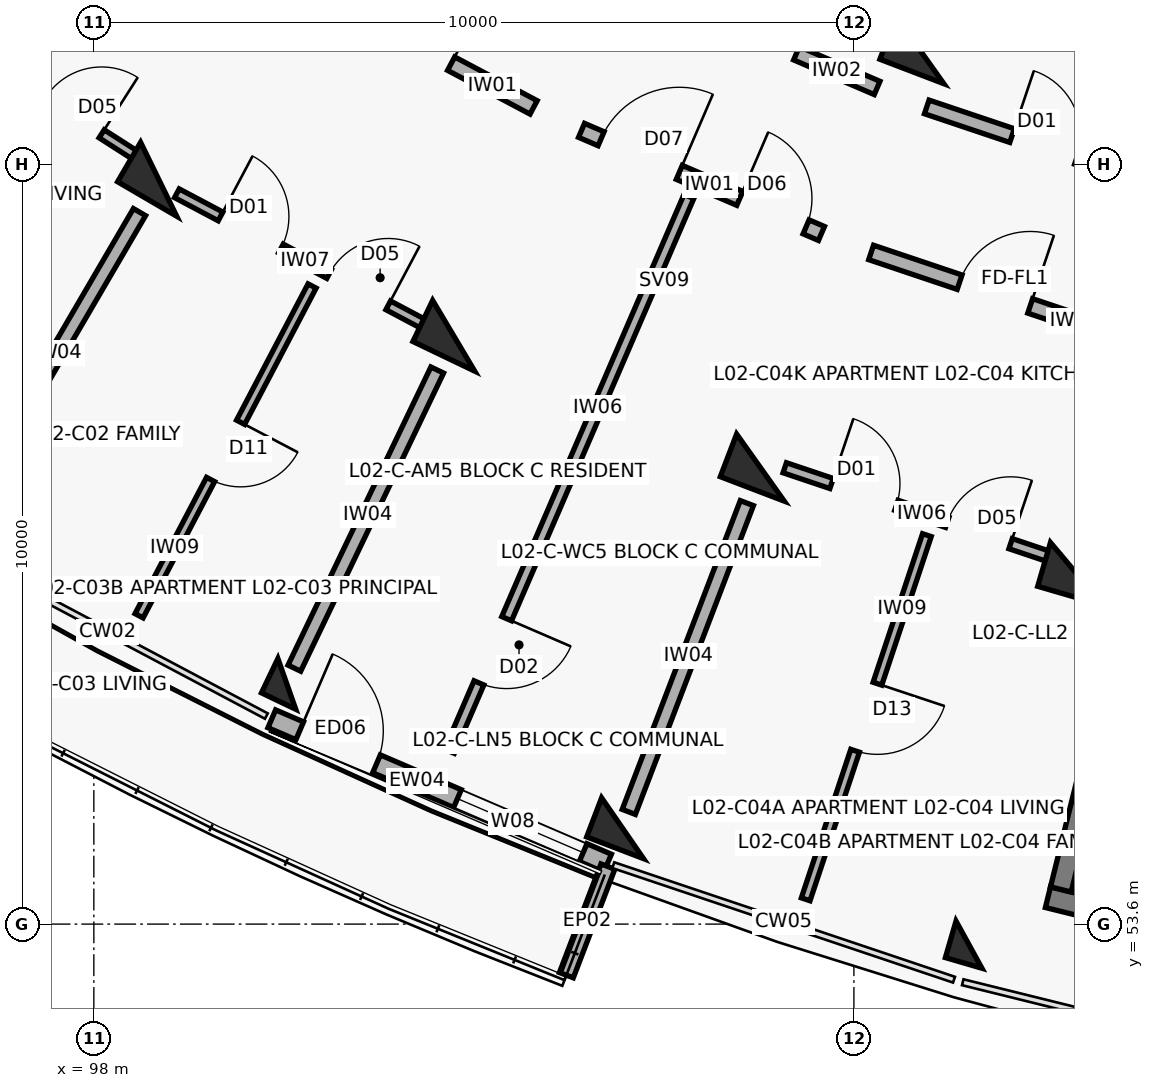
"""IFC4 building model, lengths in metres.
Left out: names, types, materials, properties, quantities, classifications, styles, units other than length and angle.
Written with IfcOpenShell. Run it as: python <this file> out.ifc"""

import sys

from ifc_helpers import new_model, si_unit, direction, frame, frame_2d, origin, origin_2d, place, context, subcontext, project, spatial, rectangle, extrude, element, fill, save


model = new_model("IFC4")
c1 = context("Model", 3, precision=1e-05, world=origin(), true_north=direction((0.0, 1.0)))
c2 = subcontext(c1, "Body", "Model", "MODEL_VIEW")
j1 = project(units=[si_unit("LENGTHUNIT", "METRE"), si_unit("PLANEANGLEUNIT", "RADIAN")], contexts=[c1])
p1 = place(None, origin())
s1 = spatial("IfcSite", under=j1, at=p1, CompositionType="ELEMENT")
p2 = place(p1, origin())
s2 = spatial("IfcBuilding", under=s1, at=p2, CompositionType="ELEMENT")
p3 = place(p2, frame((0.0, 0.0, 8.1)))
s3 = spatial("IfcBuildingStorey", under=s2, at=p3, CompositionType="ELEMENT", Elevation=8.1)
for number, where, z_axis, x_axis in (
    (1, (98.853, 63.4, 0.0), (0.0, 0.0, 1.0), (-0.504, -0.864, 0.0)),
    (2, (102.734, 61.341, 0.0), (0.0, 0.0, 1.0), (-0.432, -0.902, 0.0)),
):
    element("IfcColumn", number, at=place(p3, frame(where, z_axis=z_axis, x_axis=x_axis)), inside=s3, PredefinedType="COLUMN", context=c2, shape_type="SweptSolid", body=[
        extrude(rectangle(XDim=0.6, YDim=0.9, at=origin_2d()), origin(), (0.0, 0.0, 1.0), 3.1),
    ])
p4 = place(p3, frame((100.539, 56.76, 0.0), z_axis=(0.0, 0.0, 1.0), x_axis=(-0.432085748802, -0.901832526405, 0.0)))
e3 = element("IfcColumn", 3, at=p4, inside=s3, PredefinedType="COLUMN", context=c2, shape_type="SweptSolid", body=[
    extrude(rectangle(XDim=0.5, YDim=0.5, at=origin_2d()), origin(), (0.0, 0.0, 1.0), 3.1),
])
for number, where, z_axis, x_axis in (
    (4, (108.869, 65.099, 0.0), (0.0, 0.0, 1.0), (-0.357, -0.934, 0.0)),
    (5, (106.77, 59.606, 0.0), (0.0, 0.0, 1.0), (-0.357, -0.934, 0.0)),
):
    element("IfcColumn", number, at=place(p3, frame(where, z_axis=z_axis, x_axis=x_axis)), inside=s3, PredefinedType="COLUMN", context=c2, shape_type="SweptSolid", body=[
        extrude(rectangle(XDim=0.6, YDim=0.9, at=origin_2d()), origin(), (0.0, 0.0, 1.0), 3.1),
    ])
p5 = place(p3, frame((104.956, 54.861, 0.0), z_axis=(0.0, 0.0, 1.0), x_axis=(-0.357064076459, -0.934079892355, 0.0)))
e6 = element("IfcColumn", 6, at=p5, inside=s3, PredefinedType="COLUMN", context=c2, shape_type="SweptSolid", body=[
    extrude(rectangle(XDim=0.55, YDim=0.8, at=origin_2d()), origin(), (0.0, 0.0, 1.0), 3.1),
])
p6 = place(p3, frame((110.934, 58.207, 0.0), z_axis=(0.0, 0.0, 1.0), x_axis=(-0.27966144946, -0.96009867914, 0.0)))
e7 = element("IfcColumn", 7, at=p6, inside=s3, PredefinedType="COLUMN", context=c2, shape_type="SweptSolid", body=[
    extrude(rectangle(XDim=0.6, YDim=0.9, at=origin_2d()), origin(), (0.0, 0.0, 1.0), 3.1),
])
p7 = place(p3, frame((109.513, 53.329, 0.0), z_axis=(0.0, 0.0, 1.0), x_axis=(-0.27966144946, -0.96009867914, 0.0)))
e8 = element("IfcColumn", 8, at=p7, inside=s3, PredefinedType="COLUMN", context=c2, shape_type="SweptSolid", body=[
    extrude(rectangle(XDim=0.5, YDim=0.5, at=origin_2d()), origin(), (0.0, 0.0, 1.0), 3.1),
])
p8 = place(p3, frame((100.341, 56.301, 0.0), z_axis=(0.0, 0.0, 1.0), x_axis=(0.918737524932, -0.39486878869, 0.0)))
e9 = element("IfcWall", 9, at=p8, inside=s3, PredefinedType="SOLIDWALL", context=c2, shape_type="SweptSolid", body=[
    extrude(rectangle(XDim=4.809, YDim=0.255, at=frame_2d((2.405, 0.0))), origin(), (0.0, 0.0, 1.0), 2.25),
])
p9 = place(p8, frame((0.4, 0.0, 0.0)))
e10 = element("IfcOpeningElement", 10, at=p9, cuts=e9, PredefinedType="OPENING", context=c2, shape_type="SweptSolid", body=[
    extrude(rectangle(XDim=1.1, YDim=2.15, at=frame_2d((0.55, 1.075))), frame((0.0, 0.137, 0.0), z_axis=(0.0, -1.0, 0.0), x_axis=(1.0, 0.0, 0.0)), (0.0, 0.0, 1.0), 0.275),
])
p10 = place(p8, frame((2.659, 0.0, 0.35)))
e11 = element("IfcOpeningElement", 11, at=p10, cuts=e9, PredefinedType="OPENING", context=c2, shape_type="SweptSolid", body=[
    extrude(rectangle(XDim=1.8, YDim=1.65, at=frame_2d((0.9, 0.825))), frame((0.0, 0.137, 0.0), z_axis=(0.0, -1.0, 0.0), x_axis=(1.0, 0.0, 0.0)), (0.0, 0.0, 1.0), 0.275),
])
p11 = place(p3, frame((104.763, 54.357, 0.0), z_axis=(0.0, 0.0, 1.0), x_axis=(-0.356957296461, -0.934120703391, 0.0)))
e12 = element("IfcWall", 12, at=p11, inside=s3, PredefinedType="PARAPET", context=c2, shape_type="SweptSolid", body=[
    extrude(rectangle(XDim=1.53, YDim=0.195, at=frame_2d((0.765, 0.0))), origin(), (0.0, 0.0, 1.0), 2.25),
])
p12 = place(p3, frame((110.553, 53.954, 0.0), z_axis=(0.0, 0.0, 1.0), x_axis=(0.970725280816, -0.240192483614, 0.0)))
e13 = element("IfcWall", 13, at=p12, inside=s3, PredefinedType="SHEAR", context=c2, shape_type="SweptSolid", body=[
    extrude(rectangle(XDim=3.09, YDim=0.28, at=frame_2d((1.545, 0.0))), origin(), (0.0, 0.0, 1.0), 3.1),
])
p13 = place(p3, frame((111.21, 56.027, 0.0), z_axis=(0.0, 0.0, 1.0), x_axis=(-0.240186044774, -0.970726873995, 0.0)))
e14 = element("IfcWall", 14, at=p13, inside=s3, PredefinedType="SHEAR", context=c2, shape_type="SweptSolid", body=[
    extrude(rectangle(XDim=2.03, YDim=0.28, at=frame_2d((1.015, 0.0))), origin(), (0.0, 0.0, 1.0), 3.1),
])
p14 = place(p3, frame((95.462, 65.688, 0.0), z_axis=(0.0, 0.0, 1.0), x_axis=(0.842274914974, -0.539048205271, 0.0)))
e15 = element("IfcWall", 15, at=p14, inside=s3, PredefinedType="PARTITIONING", context=c2, shape_type="SweptSolid", body=[
    extrude(rectangle(XDim=3.785, YDim=0.125, at=frame_2d((1.893, 0.0))), origin(), (0.0, 0.0, 1.0), 2.08),
])
p15 = place(p14, frame((0.65, 0.0, 0.0)))
e16 = element("IfcOpeningElement", 16, at=p15, cuts=e15, PredefinedType="OPENING", context=c2, shape_type="SweptSolid", body=[
    extrude(rectangle(XDim=0.9, YDim=2.1, at=frame_2d((0.45, 1.05))), frame((0.0, 0.073, 0.0), z_axis=(0.0, -1.0, 0.0), x_axis=(1.0, 0.0, 0.0)), (0.0, 0.0, 1.0), 0.145),
])
p16 = place(p14, frame((2.255, 0.0, 0.0)))
e17 = element("IfcOpeningElement", 17, at=p16, cuts=e15, PredefinedType="OPENING", context=c2, shape_type="SweptSolid", body=[
    extrude(rectangle(XDim=0.88, YDim=2.1, at=frame_2d((0.44, 1.05))), frame((0.0, 0.073, 0.0), z_axis=(0.0, -1.0, 0.0), x_axis=(1.0, 0.0, 0.0)), (0.0, 0.0, 1.0), 0.145),
])
p17 = place(p3, frame((100.75, 65.956, 0.0), z_axis=(0.0, 0.0, 1.0), x_axis=(0.883440266101, -0.468543803963, 0.0)))
e18 = element("IfcWall", 18, at=p17, inside=s3, PredefinedType="SOLIDWALL", context=c2, shape_type="SweptSolid", body=[
    extrude(rectangle(XDim=3.436, YDim=0.2, at=frame_2d((1.718, 0.0))), origin(), (0.0, 0.0, 1.0), 2.08),
])
p18 = place(p17, frame((1.228, 0.0, 0.0)))
e19 = element("IfcOpeningElement", 19, at=p18, cuts=e18, PredefinedType="OPENING", context=c2, shape_type="SweptSolid", body=[
    extrude(rectangle(XDim=0.98, YDim=2.15, at=frame_2d((0.49, 1.075))), frame((0.0, 0.11, 0.0), z_axis=(0.0, -1.0, 0.0), x_axis=(1.0, 0.0, 0.0)), (0.0, 0.0, 1.0), 0.22),
])
p19 = place(p3, frame((99.093, 63.216, 0.0), z_axis=(0.0, 0.0, 1.0), x_axis=(0.883432667361, -0.468558131121, 0.0)))
e20 = element("IfcWall", 20, at=p19, inside=s3, PredefinedType="PARTITIONING", context=c2, shape_type="SweptSolid", body=[
    extrude(rectangle(XDim=3.797, YDim=0.13, at=frame_2d((1.899, 0.0))), origin(), (0.0, 0.0, 1.0), 2.08),
])
p20 = place(p19, frame((0.65, 0.0, 0.0)))
e21 = element("IfcOpeningElement", 21, at=p20, cuts=e20, PredefinedType="OPENING", context=c2, shape_type="SweptSolid", body=[
    extrude(rectangle(XDim=0.9, YDim=2.1, at=frame_2d((0.45, 1.05))), frame((0.0, 0.075, 0.0), z_axis=(0.0, -1.0, 0.0), x_axis=(1.0, 0.0, 0.0)), (0.0, 0.0, 1.0), 0.15),
])
p21 = place(p19, frame((2.267, 0.0, 0.0)))
e22 = element("IfcOpeningElement", 22, at=p21, cuts=e20, PredefinedType="OPENING", context=c2, shape_type="SweptSolid", body=[
    extrude(rectangle(XDim=0.88, YDim=2.1, at=frame_2d((0.44, 1.05))), frame((0.0, 0.075, 0.0), z_axis=(0.0, -1.0, 0.0), x_axis=(1.0, 0.0, 0.0)), (0.0, 0.0, 1.0), 0.15),
])
p22 = place(p3, frame((100.871, 61.996, 0.0), z_axis=(0.0, 0.0, 1.0), x_axis=(-0.464567298878, -0.885537816704, 0.0)))
e23 = element("IfcWall", 23, at=p22, inside=s3, PredefinedType="PARTITIONING", context=c2, shape_type="SweptSolid", body=[
    extrude(rectangle(XDim=4.9, YDim=0.12, at=frame_2d((2.45, 0.0))), origin(), (0.0, 0.0, 1.0), 2.08),
])
p23 = place(p22, frame((2.025, 0.0, 0.0)))
e24 = element("IfcOpeningElement", 24, at=p23, cuts=e23, PredefinedType="OPENING", context=c2, shape_type="SweptSolid", body=[
    extrude(rectangle(XDim=0.85, YDim=2.1, at=frame_2d((0.425, 1.05))), frame((0.0, 0.07, 0.0), z_axis=(0.0, -1.0, 0.0), x_axis=(1.0, 0.0, 0.0)), (0.0, 0.0, 1.0), 0.14),
])
p24 = place(p3, frame((98.601, 62.968, 0.0), z_axis=(0.0, 0.0, 1.0), x_axis=(-0.504216452091, -0.863577309475, 0.0)))
e25 = element("IfcWall", 25, at=p24, inside=s3, PredefinedType="SOLIDWALL", context=c2, shape_type="SweptSolid", body=[
    extrude(rectangle(XDim=4.35, YDim=0.185, at=frame_2d((2.175, 0.0))), origin(), (0.0, 0.0, 1.0), 2.08),
])
p25 = place(p3, frame((104.417, 64.044, 0.0), z_axis=(0.0, 0.0, 1.0), x_axis=(0.918718172399, -0.394913813008, 0.0)))
e26 = element("IfcWall", 26, at=p25, inside=s3, PredefinedType="SOLIDWALL", context=c2, shape_type="SweptSolid", body=[
    extrude(rectangle(XDim=3.436, YDim=0.2, at=frame_2d((1.718, 0.0))), origin(), (0.0, 0.0, 1.0), 2.08),
])
p26 = place(p25, frame((0.28, 0.0, 0.0)))
e27 = element("IfcOpeningElement", 27, at=p26, cuts=e26, PredefinedType="OPENING", context=c2, shape_type="SweptSolid", body=[
    extrude(rectangle(XDim=1.12, YDim=2.15, at=frame_2d((0.56, 1.075))), frame((0.0, 0.11, 0.0), z_axis=(0.0, -1.0, 0.0), x_axis=(1.0, 0.0, 0.0)), (0.0, 0.0, 1.0), 0.22),
])
p27 = place(p25, frame((2.266, 0.0, 0.0)))
e28 = element("IfcOpeningElement", 28, at=p27, cuts=e26, PredefinedType="OPENING", context=c2, shape_type="SweptSolid", body=[
    extrude(rectangle(XDim=0.95, YDim=2.1, at=frame_2d((0.475, 1.05))), frame((0.0, 0.11, 0.0), z_axis=(0.0, -1.0, 0.0), x_axis=(1.0, 0.0, 0.0)), (0.0, 0.0, 1.0), 0.22),
])
p28 = place(p3, frame((105.302, 65.893, 0.0), z_axis=(0.0, 0.0, 1.0), x_axis=(0.918723391052, -0.394901672235, 0.0)))
e29 = element("IfcWall", 29, at=p28, inside=s3, PredefinedType="SOLIDWALL", context=c2, shape_type="SweptSolid", body=[
    extrude(rectangle(XDim=3.269, YDim=0.19, at=frame_2d((1.634, 0.0))), origin(), (0.0, 0.0, 1.0), 2.08),
])
p29 = place(p28, frame((1.154, 0.0, 0.0)))
e30 = element("IfcOpeningElement", 30, at=p29, cuts=e29, PredefinedType="OPENING", context=c2, shape_type="SweptSolid", body=[
    extrude(rectangle(XDim=0.96, YDim=2.1, at=frame_2d((0.48, 1.05))), frame((0.0, 0.105, 0.0), z_axis=(0.0, -1.0, 0.0), x_axis=(1.0, 0.0, 0.0)), (0.0, 0.0, 1.0), 0.21),
])
p30 = place(p3, frame((105.829, 63.173, 0.0), z_axis=(0.0, 0.0, 1.0), x_axis=(-0.396278945437, -0.91813016365, 0.0)))
e31 = element("IfcWall", 31, at=p30, inside=s3, PredefinedType="PARTITIONING", context=c2, shape_type="SweptSolid", body=[
    extrude(rectangle(XDim=7.95, YDim=0.14, at=frame_2d((3.975, 0.0))), origin(), (0.0, 0.0, 1.0), 2.08),
])
p31 = place(p30, frame((6.05, 0.0, 0.0)))
e32 = element("IfcOpeningElement", 32, at=p31, cuts=e31, PredefinedType="OPENING", context=c2, shape_type="SweptSolid", body=[
    extrude(rectangle(XDim=0.92, YDim=2.1, at=frame_2d((0.46, 1.05))), frame((0.0, 0.08, 0.0), z_axis=(0.0, -1.0, 0.0), x_axis=(1.0, 0.0, 0.0)), (0.0, 0.0, 1.0), 0.16),
])
p32 = place(p3, frame((102.518, 60.89, 0.0), z_axis=(0.0, 0.0, 1.0), x_axis=(-0.432108769108, -0.901821496561, 0.0)))
e33 = element("IfcWall", 33, at=p32, inside=s3, PredefinedType="SOLIDWALL", context=c2, shape_type="SweptSolid", body=[
    extrude(rectangle(XDim=4.35, YDim=0.185, at=frame_2d((2.175, 0.0))), origin(), (0.0, 0.0, 1.0), 2.08),
])
p33 = place(p3, frame((108.227, 62.437, 0.0), z_axis=(0.0, 0.0, 1.0), x_axis=(0.947884468821, -0.318614239745, 0.0)))
e34 = element("IfcWall", 34, at=p33, inside=s3, PredefinedType="SOLIDWALL", context=c2, shape_type="SweptSolid", body=[
    extrude(rectangle(XDim=3.436, YDim=0.2, at=frame_2d((1.718, 0.0))), origin(), (0.0, 0.0, 1.0), 2.08),
])
p34 = place(p33, frame((1.228, 0.0, 0.0)))
e35 = element("IfcOpeningElement", 35, at=p34, cuts=e34, PredefinedType="OPENING", context=c2, shape_type="SweptSolid", body=[
    extrude(rectangle(XDim=0.98, YDim=2.15, at=frame_2d((0.49, 1.075))), frame((0.0, 0.11, 0.0), z_axis=(0.0, -1.0, 0.0), x_axis=(1.0, 0.0, 0.0)), (0.0, 0.0, 1.0), 0.22),
])
p35 = place(p3, frame((108.958, 64.352, 0.0), z_axis=(0.0, 0.0, 1.0), x_axis=(0.94787351033, -0.318646839643, 0.0)))
e36 = element("IfcWall", 36, at=p35, inside=s3, PredefinedType="SOLIDWALL", context=c2, shape_type="SweptSolid", body=[
    extrude(rectangle(XDim=3.269, YDim=0.19, at=frame_2d((1.634, 0.0))), origin(), (0.0, 0.0, 1.0), 2.08),
])
p36 = place(p35, frame((1.184, 0.0, 0.0)))
e37 = element("IfcOpeningElement", 37, at=p36, cuts=e36, PredefinedType="OPENING", context=c2, shape_type="SweptSolid", body=[
    extrude(rectangle(XDim=0.9, YDim=2.1, at=frame_2d((0.45, 1.05))), frame((0.0, 0.105, 0.0), z_axis=(0.0, -1.0, 0.0), x_axis=(1.0, 0.0, 0.0)), (0.0, 0.0, 1.0), 0.21),
])
p37 = place(p3, frame((107.09, 59.604, 0.0), z_axis=(0.0, 0.0, 1.0), x_axis=(0.947873924847, -0.318645606584, 0.0)))
e38 = element("IfcWall", 38, at=p37, inside=s3, PredefinedType="PARTITIONING", context=c2, shape_type="SweptSolid", body=[
    extrude(rectangle(XDim=3.785, YDim=0.14, at=frame_2d((1.893, 0.0))), origin(), (0.0, 0.0, 1.0), 2.08),
])
p38 = place(p37, frame((0.65, 0.0, 0.0)))
e39 = element("IfcOpeningElement", 39, at=p38, cuts=e38, PredefinedType="OPENING", context=c2, shape_type="SweptSolid", body=[
    extrude(rectangle(XDim=0.9, YDim=2.1, at=frame_2d((0.45, 1.05))), frame((0.0, 0.08, 0.0), z_axis=(0.0, -1.0, 0.0), x_axis=(1.0, 0.0, 0.0)), (0.0, 0.0, 1.0), 0.16),
])
p39 = place(p37, frame((2.255, 0.0, 0.0)))
e40 = element("IfcOpeningElement", 40, at=p39, cuts=e38, PredefinedType="OPENING", context=c2, shape_type="SweptSolid", body=[
    extrude(rectangle(XDim=0.88, YDim=2.1, at=frame_2d((0.44, 1.05))), frame((0.0, 0.08, 0.0), z_axis=(0.0, -1.0, 0.0), x_axis=(1.0, 0.0, 0.0)), (0.0, 0.0, 1.0), 0.16),
])
p40 = place(p3, frame((108.96, 58.718, 0.0), z_axis=(0.0, 0.0, 1.0), x_axis=(-0.315778138239, -0.948833055606, 0.0)))
e41 = element("IfcWall", 41, at=p40, inside=s3, PredefinedType="PARTITIONING", context=c2, shape_type="SweptSolid", body=[
    extrude(rectangle(XDim=5.05, YDim=0.12, at=frame_2d((2.525, 0.0))), origin(), (0.0, 0.0, 1.0), 2.08),
])
p41 = place(p40, frame((2.06, 0.0, 0.0)))
e42 = element("IfcOpeningElement", 42, at=p41, cuts=e41, PredefinedType="OPENING", context=c2, shape_type="SweptSolid", body=[
    extrude(rectangle(XDim=0.93, YDim=2.1, at=frame_2d((0.465, 1.05))), frame((0.0, 0.07, 0.0), z_axis=(0.0, -1.0, 0.0), x_axis=(1.0, 0.0, 0.0)), (0.0, 0.0, 1.0), 0.14),
])
p42 = place(p3, frame((106.591, 59.139, 0.0), z_axis=(0.0, 0.0, 1.0), x_axis=(-0.357064016205, -0.934079915388, 0.0)))
e43 = element("IfcWall", 43, at=p42, inside=s3, PredefinedType="SOLIDWALL", context=c2, shape_type="SweptSolid", body=[
    extrude(rectangle(XDim=4.35, YDim=0.185, at=frame_2d((2.175, 0.0))), origin(), (0.0, 0.0, 1.0), 2.08),
])
p43 = place(p9, origin())
e44 = element("IfcDoor", 44, at=p43, inside=s3, OperationType="SINGLE_SWING_LEFT", PredefinedType="DOOR", context=c2, shape_type="SweptSolid", body=[
    extrude(rectangle(XDim=1.1, YDim=2.15, at=frame_2d((0.55, 1.075))), frame((0.0, 0.025, 0.0), z_axis=(0.0, -1.0, 0.0), x_axis=(1.0, 0.0, 0.0)), (0.0, 0.0, 1.0), 0.05),
])
fill(e10, e44)
p44 = place(p10, origin())
e45 = element("IfcWindow", 45, at=p44, inside=s3, PartitioningType="TRIPLE_PANEL_VERTICAL", PredefinedType="WINDOW", context=c2, shape_type="SweptSolid", body=[
    extrude(rectangle(XDim=1.8, YDim=1.65, at=frame_2d((0.9, 0.825))), frame((0.0, 0.03, 0.0), z_axis=(0.0, -1.0, 0.0), x_axis=(1.0, 0.0, 0.0)), (0.0, 0.0, 1.0), 0.06),
])
fill(e11, e45)
p45 = place(p16, origin())
e46 = element("IfcDoor", 46, at=p45, inside=s3, OperationType="SINGLE_SWING_RIGHT", PredefinedType="DOOR", context=c2, shape_type="SweptSolid", body=[
    extrude(rectangle(XDim=0.88, YDim=2.1, at=frame_2d((0.44, 1.05))), frame((0.0, 0.025, 0.0), z_axis=(0.0, -1.0, 0.0), x_axis=(1.0, 0.0, 0.0)), (0.0, 0.0, 1.0), 0.05),
])
fill(e17, e46)
p46 = place(p18, origin())
e47 = element("IfcDoor", 47, at=p46, inside=s3, OperationType="SINGLE_SWING_RIGHT", PredefinedType="DOOR", context=c2, shape_type="SweptSolid", body=[
    extrude(rectangle(XDim=0.98, YDim=2.15, at=frame_2d((0.49, 1.075))), frame((0.0, 0.025, 0.0), z_axis=(0.0, -1.0, 0.0), x_axis=(1.0, 0.0, 0.0)), (0.0, 0.0, 1.0), 0.05),
])
fill(e19, e47)
p47 = place(p20, origin())
e48 = element("IfcDoor", 48, at=p47, inside=s3, OperationType="SINGLE_SWING_LEFT", PredefinedType="DOOR", context=c2, shape_type="SweptSolid", body=[
    extrude(rectangle(XDim=0.9, YDim=2.1, at=frame_2d((0.45, 1.05))), frame((0.0, 0.025, 0.0), z_axis=(0.0, -1.0, 0.0), x_axis=(1.0, 0.0, 0.0)), (0.0, 0.0, 1.0), 0.05),
])
fill(e21, e48)
p48 = place(p21, origin())
e49 = element("IfcDoor", 49, at=p48, inside=s3, OperationType="SINGLE_SWING_RIGHT", PredefinedType="DOOR", context=c2, shape_type="SweptSolid", body=[
    extrude(rectangle(XDim=0.88, YDim=2.1, at=frame_2d((0.44, 1.05))), frame((0.0, 0.025, 0.0), z_axis=(0.0, -1.0, 0.0), x_axis=(1.0, 0.0, 0.0)), (0.0, 0.0, 1.0), 0.05),
])
fill(e22, e49)
p49 = place(p23, origin())
e50 = element("IfcDoor", 50, at=p49, inside=s3, OperationType="SINGLE_SWING_LEFT", PredefinedType="DOOR", context=c2, shape_type="SweptSolid", body=[
    extrude(rectangle(XDim=0.85, YDim=2.1, at=frame_2d((0.425, 1.05))), frame((0.0, 0.025, 0.0), z_axis=(0.0, -1.0, 0.0), x_axis=(1.0, 0.0, 0.0)), (0.0, 0.0, 1.0), 0.05),
])
fill(e24, e50)
p50 = place(p26, origin())
e51 = element("IfcDoor", 51, at=p50, inside=s3, OperationType="SINGLE_SWING_RIGHT", PredefinedType="DOOR", context=c2, shape_type="SweptSolid", body=[
    extrude(rectangle(XDim=1.12, YDim=2.15, at=frame_2d((0.56, 1.075))), frame((0.0, 0.025, 0.0), z_axis=(0.0, -1.0, 0.0), x_axis=(1.0, 0.0, 0.0)), (0.0, 0.0, 1.0), 0.05),
])
fill(e27, e51)
p51 = place(p27, origin())
e52 = element("IfcDoor", 52, at=p51, inside=s3, OperationType="SINGLE_SWING_LEFT", PredefinedType="DOOR", context=c2, shape_type="SweptSolid", body=[
    extrude(rectangle(XDim=0.95, YDim=2.1, at=frame_2d((0.475, 1.05))), frame((0.0, 0.025, 0.0), z_axis=(0.0, -1.0, 0.0), x_axis=(1.0, 0.0, 0.0)), (0.0, 0.0, 1.0), 0.05),
])
fill(e28, e52)
p52 = place(p29, origin())
e53 = element("IfcDoor", 53, at=p52, inside=s3, OperationType="SINGLE_SWING_RIGHT", PredefinedType="DOOR", context=c2, shape_type="SweptSolid", body=[
    extrude(rectangle(XDim=0.96, YDim=2.1, at=frame_2d((0.48, 1.05))), frame((0.0, 0.025, 0.0), z_axis=(0.0, -1.0, 0.0), x_axis=(1.0, 0.0, 0.0)), (0.0, 0.0, 1.0), 0.05),
])
fill(e30, e53)
p53 = place(p31, origin())
e54 = element("IfcDoor", 54, at=p53, inside=s3, OperationType="SINGLE_SWING_LEFT", PredefinedType="DOOR", context=c2, shape_type="SweptSolid", body=[
    extrude(rectangle(XDim=0.92, YDim=2.1, at=frame_2d((0.46, 1.05))), frame((0.0, 0.025, 0.0), z_axis=(0.0, -1.0, 0.0), x_axis=(1.0, 0.0, 0.0)), (0.0, 0.0, 1.0), 0.05),
])
fill(e32, e54)
p54 = place(p34, origin())
e55 = element("IfcDoor", 55, at=p54, inside=s3, OperationType="SINGLE_SWING_RIGHT", PredefinedType="DOOR", context=c2, shape_type="SweptSolid", body=[
    extrude(rectangle(XDim=0.98, YDim=2.15, at=frame_2d((0.49, 1.075))), frame((0.0, 0.025, 0.0), z_axis=(0.0, -1.0, 0.0), x_axis=(1.0, 0.0, 0.0)), (0.0, 0.0, 1.0), 0.05),
])
fill(e35, e55)
p55 = place(p36, origin())
e56 = element("IfcDoor", 56, at=p55, inside=s3, OperationType="SINGLE_SWING_LEFT", PredefinedType="DOOR", context=c2, shape_type="SweptSolid", body=[
    extrude(rectangle(XDim=0.9, YDim=2.1, at=frame_2d((0.45, 1.05))), frame((0.0, 0.025, 0.0), z_axis=(0.0, -1.0, 0.0), x_axis=(1.0, 0.0, 0.0)), (0.0, 0.0, 1.0), 0.05),
])
fill(e37, e56)
p56 = place(p38, origin())
e57 = element("IfcDoor", 57, at=p56, inside=s3, OperationType="SINGLE_SWING_LEFT", PredefinedType="DOOR", context=c2, shape_type="SweptSolid", body=[
    extrude(rectangle(XDim=0.9, YDim=2.1, at=frame_2d((0.45, 1.05))), frame((0.0, 0.025, 0.0), z_axis=(0.0, -1.0, 0.0), x_axis=(1.0, 0.0, 0.0)), (0.0, 0.0, 1.0), 0.05),
])
fill(e39, e57)
p57 = place(p39, origin())
e58 = element("IfcDoor", 58, at=p57, inside=s3, OperationType="SINGLE_SWING_RIGHT", PredefinedType="DOOR", context=c2, shape_type="SweptSolid", body=[
    extrude(rectangle(XDim=0.88, YDim=2.1, at=frame_2d((0.44, 1.05))), frame((0.0, 0.025, 0.0), z_axis=(0.0, -1.0, 0.0), x_axis=(1.0, 0.0, 0.0)), (0.0, 0.0, 1.0), 0.05),
])
fill(e40, e58)
p58 = place(p41, origin())
e59 = element("IfcDoor", 59, at=p58, inside=s3, OperationType="SINGLE_SWING_LEFT", PredefinedType="DOOR", context=c2, shape_type="SweptSolid", body=[
    extrude(rectangle(XDim=0.93, YDim=2.1, at=frame_2d((0.465, 1.05))), frame((0.0, 0.025, 0.0), z_axis=(0.0, -1.0, 0.0), x_axis=(1.0, 0.0, 0.0)), (0.0, 0.0, 1.0), 0.05),
])
fill(e42, e59)
save(model, sys.argv[1])
